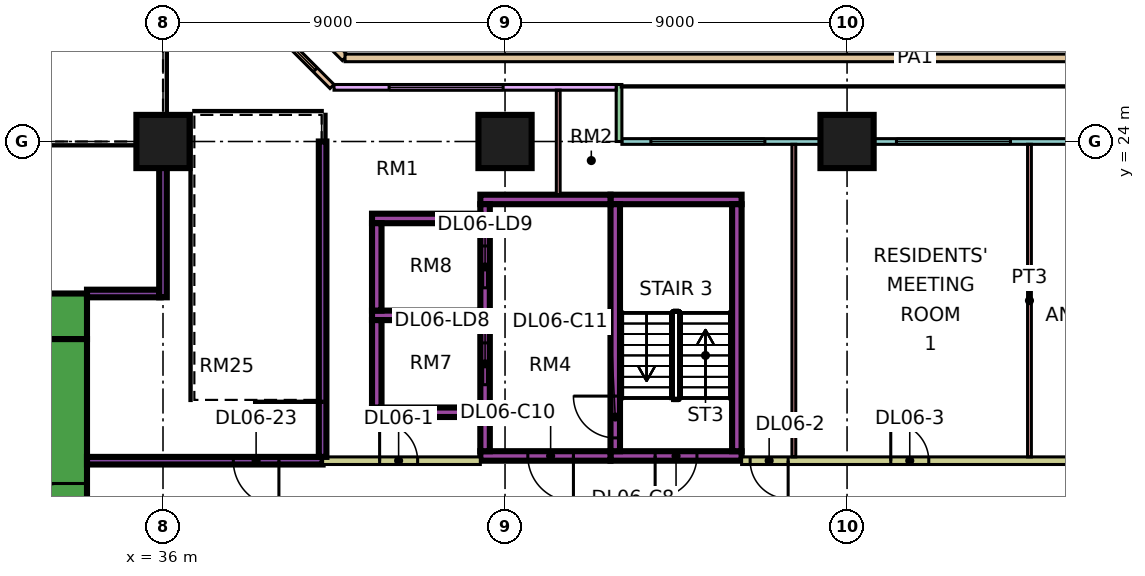
"""IFC4 building model, lengths in metres.
Left out: names, types, materials, properties, quantities, classifications, styles, units other than length and angle.
Written with IfcOpenShell. Run it as: python <this file> out.ifc"""

import sys

from ifc_helpers import new_model, si_unit, direction, frame, frame_2d, origin, origin_2d, place, context, subcontext, project, spatial, rectangle, extrude, element, fill, save


model = new_model("IFC4")
c1 = context("Model", 3, precision=1e-05, world=origin(), true_north=direction((0.0, 1.0)))
c2 = subcontext(c1, "Body", "Model", "MODEL_VIEW")
j1 = project(units=[si_unit("LENGTHUNIT", "METRE"), si_unit("PLANEANGLEUNIT", "RADIAN")], contexts=[c1])
p1 = place(None, origin())
s1 = spatial("IfcSite", under=j1, at=p1, CompositionType="ELEMENT")
p2 = place(p1, origin())
s2 = spatial("IfcBuilding", under=s1, at=p2, CompositionType="ELEMENT")
p3 = place(p2, frame((0.0, 0.0, 35.4)))
s3 = spatial("IfcBuildingStorey", under=s2, at=p3, CompositionType="ELEMENT", Elevation=35.4)
for number, where, z_axis, x_axis in (
    (1, (36.0, 24.0, 0.0), (0.0, 0.0, 1.0), (1.0, 0.0, 0.0)),
    (2, (45.0, 24.0, 0.0), (0.0, 0.0, 1.0), (1.0, 0.0, 0.0)),
    (3, (54.0, 24.0, 0.0), (0.0, 0.0, 1.0), (1.0, 0.0, 0.0)),
):
    element("IfcColumn", number, at=place(p3, frame(where, z_axis=z_axis, x_axis=x_axis)), inside=s3, PredefinedType="COLUMN", context=c2, shape_type="SweptSolid", body=[
        extrude(rectangle(XDim=1.4, YDim=1.4, at=origin_2d()), origin(), (0.0, 0.0, 1.0), 6.0),
    ])
p4 = place(p3, frame((9.0, 19.4, 0.0), z_axis=(0.0, 0.0, 1.0), x_axis=(1.0, 0.0, 0.0)))
e4 = element("IfcWall", 4, at=p4, inside=s3, PredefinedType="SHEAR", context=c2, shape_type="SweptSolid", body=[
    extrude(rectangle(XDim=25.0, YDim=1.2, at=frame_2d((12.5, 0.0))), origin(), (0.0, 0.0, 1.0), 6.0),
])
p5 = place(p4, frame((19.1, 0.0, 0.0)))
e5 = element("IfcOpeningElement", 5, at=p5, cuts=e4, PredefinedType="OPENING", context=c2, shape_type="SweptSolid", body=[
    extrude(rectangle(XDim=1.8, YDim=2.4, at=frame_2d((0.9, 1.2))), frame((0.0, 0.61, 0.0), z_axis=(0.0, -1.0, 0.0), x_axis=(1.0, 0.0, 0.0)), (0.0, 0.0, 1.0), 1.22),
])
p6 = place(p3, frame((33.4, 8.2, 0.0), z_axis=(0.0, 0.0, 1.0), x_axis=(0.0, 1.0, 0.0)))
e6 = element("IfcWall", 6, at=p6, inside=s3, PredefinedType="SHEAR", context=c2, shape_type="SweptSolid", body=[
    extrude(rectangle(XDim=10.6, YDim=1.2, at=frame_2d((5.3, 0.0))), origin(), (0.0, 0.0, 1.0), 6.0),
])
p7 = place(p6, frame((5.0, 0.0, 0.0)))
e7 = element("IfcOpeningElement", 7, at=p7, cuts=e6, PredefinedType="OPENING", context=c2, shape_type="SweptSolid", body=[
    extrude(rectangle(XDim=1.8, YDim=2.4, at=frame_2d((0.9, 1.2))), frame((0.0, 0.61, 0.0), z_axis=(0.0, -1.0, 0.0), x_axis=(1.0, 0.0, 0.0)), (0.0, 0.0, 1.0), 1.22),
])
p8 = place(p3, frame((47.775, 15.725, 0.0), z_axis=(0.0, 0.0, 1.0), x_axis=(1.0, 0.0, 0.0)))
e8 = element("IfcWall", 8, at=p8, inside=s3, PredefinedType="SHEAR", context=c2, shape_type="SweptSolid", body=[
    extrude(rectangle(XDim=3.45, YDim=0.25, at=frame_2d((1.725, 0.0))), origin(), (0.0, 0.0, 1.0), 6.0),
])
p9 = place(p8, frame((1.175, 0.0, 0.0)))
e9 = element("IfcOpeningElement", 9, at=p9, cuts=e8, PredefinedType="OPENING", context=c2, shape_type="SweptSolid", body=[
    extrude(rectangle(XDim=1.1, YDim=2.2, at=frame_2d((0.55, 1.1))), frame((0.0, 0.135, 0.0), z_axis=(0.0, -1.0, 0.0), x_axis=(1.0, 0.0, 0.0)), (0.0, 0.0, 1.0), 0.27),
])
p10 = place(p3, frame((47.775, 22.475, 0.0), z_axis=(0.0, 0.0, 1.0), x_axis=(1.0, 0.0, 0.0)))
e10 = element("IfcWall", 10, at=p10, inside=s3, PredefinedType="SHEAR", context=c2, shape_type="SweptSolid", body=[
    extrude(rectangle(XDim=3.45, YDim=0.25, at=frame_2d((1.725, 0.0))), origin(), (0.0, 0.0, 1.0), 6.0),
])
p11 = place(p3, frame((47.9, 15.85, 0.0), z_axis=(0.0, 0.0, 1.0), x_axis=(0.0, 1.0, 0.0)))
e11 = element("IfcWall", 11, at=p11, inside=s3, PredefinedType="SHEAR", context=c2, shape_type="SweptSolid", body=[
    extrude(rectangle(XDim=6.5, YDim=0.25, at=frame_2d((3.25, 0.0))), origin(), (0.0, 0.0, 1.0), 6.0),
])
p12 = place(p11, frame((0.35, 0.0, 0.0)))
e12 = element("IfcOpeningElement", 12, at=p12, cuts=e11, PredefinedType="OPENING", context=c2, shape_type="SweptSolid", body=[
    extrude(rectangle(XDim=1.1, YDim=2.2, at=frame_2d((0.55, 1.1))), frame((0.0, 0.135, 0.0), z_axis=(0.0, -1.0, 0.0), x_axis=(1.0, 0.0, 0.0)), (0.0, 0.0, 1.0), 0.27),
])
p13 = place(p3, frame((51.1, 15.85, 0.0), z_axis=(0.0, 0.0, 1.0), x_axis=(0.0, 1.0, 0.0)))
e13 = element("IfcWall", 13, at=p13, inside=s3, PredefinedType="SHEAR", context=c2, shape_type="SweptSolid", body=[
    extrude(rectangle(XDim=6.5, YDim=0.25, at=frame_2d((3.25, 0.0))), origin(), (0.0, 0.0, 1.0), 6.0),
])
p14 = place(p3, frame((44.35, 15.725, 0.0), z_axis=(0.0, 0.0, 1.0), x_axis=(1.0, 0.0, 0.0)))
e14 = element("IfcWall", 14, at=p14, inside=s3, PredefinedType="SHEAR", context=c2, shape_type="SweptSolid", body=[
    extrude(rectangle(XDim=3.425, YDim=0.25, at=frame_2d((1.712, 0.0))), origin(), (0.0, 0.0, 1.0), 6.0),
])
p15 = place(p14, frame((1.25, 0.0, 0.0)))
e15 = element("IfcOpeningElement", 15, at=p15, cuts=e14, PredefinedType="OPENING", context=c2, shape_type="SweptSolid", body=[
    extrude(rectangle(XDim=1.2, YDim=2.2, at=frame_2d((0.6, 1.1))), frame((0.0, 0.135, 0.0), z_axis=(0.0, -1.0, 0.0), x_axis=(1.0, 0.0, 0.0)), (0.0, 0.0, 1.0), 0.27),
])
p16 = place(p3, frame((44.35, 22.475, 0.0), z_axis=(0.0, 0.0, 1.0), x_axis=(1.0, 0.0, 0.0)))
e16 = element("IfcWall", 16, at=p16, inside=s3, PredefinedType="SHEAR", context=c2, shape_type="SweptSolid", body=[
    extrude(rectangle(XDim=3.425, YDim=0.25, at=frame_2d((1.712, 0.0))), origin(), (0.0, 0.0, 1.0), 6.0),
])
p17 = place(p3, frame((44.475, 15.85, 0.0), z_axis=(0.0, 0.0, 1.0), x_axis=(0.0, 1.0, 0.0)))
e17 = element("IfcWall", 17, at=p17, inside=s3, PredefinedType="SHEAR", context=c2, shape_type="SweptSolid", body=[
    extrude(rectangle(XDim=6.5, YDim=0.25, at=frame_2d((3.25, 0.0))), origin(), (0.0, 0.0, 1.0), 6.0),
])
p18 = place(p17, frame((1.75, 0.0, 0.0)))
e18 = element("IfcOpeningElement", 18, at=p18, cuts=e17, PredefinedType="OPENING", context=c2, shape_type="SweptSolid", body=[
    extrude(rectangle(XDim=1.1, YDim=2.2, at=frame_2d((0.55, 1.1))), frame((0.0, 0.135, 0.0), z_axis=(0.0, -1.0, 0.0), x_axis=(1.0, 0.0, 0.0)), (0.0, 0.0, 1.0), 0.27),
])
p19 = place(p17, frame((4.3, 0.0, 0.0)))
e19 = element("IfcOpeningElement", 19, at=p19, cuts=e17, PredefinedType="OPENING", context=c2, shape_type="SweptSolid", body=[
    extrude(rectangle(XDim=1.1, YDim=2.2, at=frame_2d((0.55, 1.1))), frame((0.0, 0.135, 0.0), z_axis=(0.0, -1.0, 0.0), x_axis=(1.0, 0.0, 0.0)), (0.0, 0.0, 1.0), 0.27),
])
for number, where, z_axis, x_axis in (
    (20, (41.5, 16.875, 0.0), (0.0, 0.0, 1.0), (1.0, 0.0, 0.0)),
    (21, (41.5, 19.425, 0.0), (0.0, 0.0, 1.0), (1.0, 0.0, 0.0)),
    (22, (41.5, 21.975, 0.0), (0.0, 0.0, 1.0), (1.0, 0.0, 0.0)),
):
    element("IfcWall", number, at=place(p3, frame(where, z_axis=z_axis, x_axis=x_axis)), inside=s3, PredefinedType="SHEAR", context=c2, shape_type="SweptSolid", body=[
        extrude(rectangle(XDim=2.85, YDim=0.25, at=frame_2d((1.425, 0.0))), origin(), (0.0, 0.0, 1.0), 6.0),
    ])
for number, where, z_axis, x_axis in (
    (23, (41.625, 17.0, 0.0), (0.0, 0.0, 1.0), (0.0, 1.0, 0.0)),
    (24, (41.625, 19.55, 0.0), (0.0, 0.0, 1.0), (0.0, 1.0, 0.0)),
):
    element("IfcWall", number, at=place(p3, frame(where, z_axis=z_axis, x_axis=x_axis)), inside=s3, PredefinedType="SHEAR", context=c2, shape_type="SweptSolid", body=[
        extrude(rectangle(XDim=2.3, YDim=0.25, at=frame_2d((1.15, 0.0))), origin(), (0.0, 0.0, 1.0), 6.0),
    ])
p20 = place(p3, frame((59.925, 24.0, 0.0), z_axis=(0.0, 0.0, 1.0), x_axis=(-1.0, 0.0, 0.0)))
e25 = element("IfcWall", 25, at=p20, inside=s3, PredefinedType="SOLIDWALL", context=c2, shape_type="SweptSolid", body=[
    extrude(rectangle(XDim=11.85, YDim=0.15, at=frame_2d((5.925, 0.0))), origin(), (0.0, 0.0, 1.0), 5.6),
])
p21 = place(p20, frame((1.625, 0.0, 0.45)))
e26 = element("IfcOpeningElement", 26, at=p21, cuts=e25, PredefinedType="OPENING", context=c2, shape_type="SweptSolid", body=[
    extrude(rectangle(XDim=3.0, YDim=3.6, at=frame_2d((1.5, 1.8))), frame((0.0, 0.085, 0.0), z_axis=(0.0, -1.0, 0.0), x_axis=(1.0, 0.0, 0.0)), (0.0, 0.0, 1.0), 0.17),
])
p22 = place(p20, frame((8.087, 0.0, 0.45)))
e27 = element("IfcOpeningElement", 27, at=p22, cuts=e25, PredefinedType="OPENING", context=c2, shape_type="SweptSolid", body=[
    extrude(rectangle(XDim=3.0, YDim=3.6, at=frame_2d((1.5, 1.8))), frame((0.0, 0.085, 0.0), z_axis=(0.0, -1.0, 0.0), x_axis=(1.0, 0.0, 0.0)), (0.0, 0.0, 1.0), 0.17),
])
p23 = place(p3, frame((48.0, 25.5, 0.0), z_axis=(0.0, 0.0, 1.0), x_axis=(0.0, -1.0, 0.0)))
e28 = element("IfcWall", 28, at=p23, inside=s3, PredefinedType="SOLIDWALL", context=c2, shape_type="SweptSolid", body=[
    extrude(rectangle(XDim=1.5, YDim=0.15, at=frame_2d((0.75, 0.0))), origin(), (0.0, 0.0, 1.0), 5.6),
])
p24 = place(p3, frame((47.925, 25.425, 0.0), z_axis=(0.0, 0.0, 1.0), x_axis=(-1.0, 0.0, 0.0)))
e29 = element("IfcWall", 29, at=p24, inside=s3, PredefinedType="SOLIDWALL", context=c2, shape_type="SweptSolid", body=[
    extrude(rectangle(XDim=7.425, YDim=0.15, at=frame_2d((3.712, 0.0))), origin(), (0.0, 0.0, 1.0), 5.6),
])
p25 = place(p24, frame((2.975, 0.0, 0.45)))
e30 = element("IfcOpeningElement", 30, at=p25, cuts=e29, PredefinedType="OPENING", context=c2, shape_type="SweptSolid", body=[
    extrude(rectangle(XDim=3.0, YDim=3.6, at=frame_2d((1.5, 1.8))), frame((0.0, 0.085, 0.0), z_axis=(0.0, -1.0, 0.0), x_axis=(1.0, 0.0, 0.0)), (0.0, 0.0, 1.0), 0.17),
])
p26 = place(p3, frame((40.447, 25.447, 0.0), z_axis=(0.0, 0.0, 1.0), x_axis=(-0.707106781187, 0.707106781187, 0.0)))
e31 = element("IfcWall", 31, at=p26, inside=s3, PredefinedType="SOLIDWALL", context=c2, shape_type="SweptSolid", body=[
    extrude(rectangle(XDim=4.243, YDim=0.15, at=frame_2d((2.121, 0.0))), origin(), (0.0, 0.0, 1.0), 5.6),
])
p27 = place(p26, frame((0.621, 0.0, 0.45)))
e32 = element("IfcOpeningElement", 32, at=p27, cuts=e31, PredefinedType="OPENING", context=c2, shape_type="SweptSolid", body=[
    extrude(rectangle(XDim=3.0, YDim=3.6, at=frame_2d((1.5, 1.8))), frame((0.0, 0.085, 0.0), z_axis=(0.0, -1.0, 0.0), x_axis=(1.0, 0.0, 0.0)), (0.0, 0.0, 1.0), 0.17),
])
p28 = place(p3, frame((38.2, 28.79, 0.0), z_axis=(0.0, 0.0, 1.0), x_axis=(0.707106781187, -0.707106781187, 0.0)))
e33 = element("IfcWall", 33, at=p28, inside=s3, PredefinedType="PARAPET", context=c2, shape_type="SweptSolid", body=[
    extrude(rectangle(XDim=3.663, YDim=0.2, at=frame_2d((1.832, 0.0))), origin(), (0.0, 0.0, 1.0), 0.5),
])
p29 = place(p3, frame((40.79, 26.2, 0.0), z_axis=(0.0, 0.0, 1.0), x_axis=(1.0, 0.0, 0.0)))
e34 = element("IfcWall", 34, at=p29, inside=s3, PredefinedType="PARAPET", context=c2, shape_type="SweptSolid", body=[
    extrude(rectangle(XDim=30.0, YDim=0.2, at=frame_2d((15.0, 0.0))), origin(), (0.0, 0.0, 1.0), 0.5),
])
p30 = place(p3, frame((34.0, 15.6, 0.0), z_axis=(0.0, 0.0, 1.0), x_axis=(1.0, 0.0, 0.0)))
e35 = element("IfcWall", 35, at=p30, inside=s3, PredefinedType="SOLIDWALL", context=c2, shape_type="SweptSolid", body=[
    extrude(rectangle(XDim=6.2, YDim=0.2, at=frame_2d((3.1, 0.0))), origin(), (0.0, 0.0, 1.0), 5.6),
])
p31 = place(p30, frame((3.85, 0.0, 0.0)))
e36 = element("IfcOpeningElement", 36, at=p31, cuts=e35, PredefinedType="OPENING", context=c2, shape_type="SweptSolid", body=[
    extrude(rectangle(XDim=1.2, YDim=2.1, at=frame_2d((0.6, 1.05))), frame((0.0, 0.11, 0.0), z_axis=(0.0, -1.0, 0.0), x_axis=(1.0, 0.0, 0.0)), (0.0, 0.0, 1.0), 0.22),
])
p32 = place(p3, frame((34.0, 20.0, 0.0), z_axis=(0.0, 0.0, 1.0), x_axis=(1.0, 0.0, 0.0)))
e37 = element("IfcWall", 37, at=p32, inside=s3, PredefinedType="SOLIDWALL", context=c2, shape_type="SweptSolid", body=[
    extrude(rectangle(XDim=1.9, YDim=0.2, at=frame_2d((0.95, 0.0))), origin(), (0.0, 0.0, 1.0), 5.6),
])
p33 = place(p3, frame((36.0, 19.9, 0.0), z_axis=(0.0, 0.0, 1.0), x_axis=(0.0, 1.0, 0.0)))
e38 = element("IfcWall", 38, at=p33, inside=s3, PredefinedType="SOLIDWALL", context=c2, shape_type="SweptSolid", body=[
    extrude(rectangle(XDim=4.1, YDim=0.2, at=frame_2d((2.05, 0.0))), origin(), (0.0, 0.0, 1.0), 5.6),
])
p34 = place(p3, frame((40.2, 15.6, 0.0), z_axis=(0.0, 0.0, 1.0), x_axis=(1.0, 0.0, 0.0)))
e39 = element("IfcWall", 39, at=p34, inside=s3, PredefinedType="PARTITIONING", context=c2, shape_type="SweptSolid", body=[
    extrude(rectangle(XDim=4.15, YDim=0.2, at=frame_2d((2.075, 0.0))), origin(), (0.0, 0.0, 1.0), 5.6),
])
p35 = place(p34, frame((1.5, 0.0, 0.0)))
e40 = element("IfcOpeningElement", 40, at=p35, cuts=e39, PredefinedType="OPENING", context=c2, shape_type="SweptSolid", body=[
    extrude(rectangle(XDim=1.0, YDim=2.1, at=frame_2d((0.5, 1.05))), frame((0.0, 0.11, 0.0), z_axis=(0.0, -1.0, 0.0), x_axis=(1.0, 0.0, 0.0)), (0.0, 0.0, 1.0), 0.22),
])
p36 = place(p3, frame((40.2, 15.7, 0.0), z_axis=(0.0, 0.0, 1.0), x_axis=(0.0, 1.0, 0.0)))
e41 = element("IfcWall", 41, at=p36, inside=s3, PredefinedType="SOLIDWALL", context=c2, shape_type="SweptSolid", body=[
    extrude(rectangle(XDim=8.3, YDim=0.2, at=frame_2d((4.15, 0.0))), origin(), (0.0, 0.0, 1.0), 5.6),
])
p37 = place(p3, frame((46.4, 22.6, 0.0), z_axis=(0.0, 0.0, 1.0), x_axis=(0.0, 1.0, 0.0)))
e42 = element("IfcWall", 42, at=p37, inside=s3, PredefinedType="PARTITIONING", context=c2, shape_type="SweptSolid", body=[
    extrude(rectangle(XDim=2.751, YDim=0.1, at=frame_2d((1.375, 0.0))), origin(), (0.0, 0.0, 1.0), 5.6),
])
p38 = place(p3, frame((51.225, 15.6, 0.0), z_axis=(0.0, 0.0, 1.0), x_axis=(1.0, 0.0, 0.0)))
e43 = element("IfcWall", 43, at=p38, inside=s3, PredefinedType="PARTITIONING", context=c2, shape_type="SweptSolid", body=[
    extrude(rectangle(XDim=21.575, YDim=0.2, at=frame_2d((10.788, 0.0))), origin(), (0.0, 0.0, 1.0), 5.6),
])
p39 = place(p38, frame((0.225, 0.0, 0.0)))
e44 = element("IfcOpeningElement", 44, at=p39, cuts=e43, PredefinedType="OPENING", context=c2, shape_type="SweptSolid", body=[
    extrude(rectangle(XDim=1.0, YDim=2.1, at=frame_2d((0.5, 1.05))), frame((0.0, 0.11, 0.0), z_axis=(0.0, -1.0, 0.0), x_axis=(1.0, 0.0, 0.0)), (0.0, 0.0, 1.0), 0.22),
])
p40 = place(p38, frame((3.925, 0.0, 0.0)))
e45 = element("IfcOpeningElement", 45, at=p40, cuts=e43, PredefinedType="OPENING", context=c2, shape_type="SweptSolid", body=[
    extrude(rectangle(XDim=1.0, YDim=2.1, at=frame_2d((0.5, 1.05))), frame((0.0, 0.11, 0.0), z_axis=(0.0, -1.0, 0.0), x_axis=(1.0, 0.0, 0.0)), (0.0, 0.0, 1.0), 0.22),
])
p41 = place(p38, frame((10.125, 0.0, 0.0)))
e46 = element("IfcOpeningElement", 46, at=p41, cuts=e43, PredefinedType="OPENING", context=c2, shape_type="SweptSolid", body=[
    extrude(rectangle(XDim=1.0, YDim=2.1, at=frame_2d((0.5, 1.05))), frame((0.0, 0.11, 0.0), z_axis=(0.0, -1.0, 0.0), x_axis=(1.0, 0.0, 0.0)), (0.0, 0.0, 1.0), 0.22),
])
p42 = place(p38, frame((16.325, 0.0, 0.0)))
e47 = element("IfcOpeningElement", 47, at=p42, cuts=e43, PredefinedType="OPENING", context=c2, shape_type="SweptSolid", body=[
    extrude(rectangle(XDim=1.0, YDim=2.1, at=frame_2d((0.5, 1.05))), frame((0.0, 0.11, 0.0), z_axis=(0.0, -1.0, 0.0), x_axis=(1.0, 0.0, 0.0)), (0.0, 0.0, 1.0), 0.22),
])
for number, where, z_axis, x_axis in (
    (48, (52.6, 15.7, 0.0), (0.0, 0.0, 1.0), (0.0, 1.0, 0.0)),
    (49, (58.8, 15.7, 0.0), (0.0, 0.0, 1.0), (0.0, 1.0, 0.0)),
):
    element("IfcWall", number, at=place(p3, frame(where, z_axis=z_axis, x_axis=x_axis)), inside=s3, PredefinedType="PARTITIONING", context=c2, shape_type="SweptSolid", body=[
        extrude(rectangle(XDim=8.226, YDim=0.1, at=frame_2d((4.113, 0.0))), origin(), (0.0, 0.0, 1.0), 5.6),
    ])
p43 = place(p21, origin())
e50 = element("IfcWindow", 50, at=p43, inside=s3, PartitioningType="SINGLE_PANEL", PredefinedType="WINDOW", context=c2, shape_type="SweptSolid", body=[
    extrude(rectangle(XDim=3.0, YDim=3.6, at=frame_2d((1.5, 1.8))), frame((0.0, 0.03, 0.0), z_axis=(0.0, -1.0, 0.0), x_axis=(1.0, 0.0, 0.0)), (0.0, 0.0, 1.0), 0.06),
])
fill(e26, e50)
p44 = place(p22, origin())
e51 = element("IfcWindow", 51, at=p44, inside=s3, PartitioningType="SINGLE_PANEL", PredefinedType="WINDOW", context=c2, shape_type="SweptSolid", body=[
    extrude(rectangle(XDim=3.0, YDim=3.6, at=frame_2d((1.5, 1.8))), frame((0.0, 0.03, 0.0), z_axis=(0.0, -1.0, 0.0), x_axis=(1.0, 0.0, 0.0)), (0.0, 0.0, 1.0), 0.06),
])
fill(e27, e51)
p45 = place(p25, origin())
e52 = element("IfcWindow", 52, at=p45, inside=s3, PartitioningType="SINGLE_PANEL", PredefinedType="WINDOW", context=c2, shape_type="SweptSolid", body=[
    extrude(rectangle(XDim=3.0, YDim=3.6, at=frame_2d((1.5, 1.8))), frame((0.0, 0.03, 0.0), z_axis=(0.0, -1.0, 0.0), x_axis=(1.0, 0.0, 0.0)), (0.0, 0.0, 1.0), 0.06),
])
fill(e30, e52)
p46 = place(p27, origin())
e53 = element("IfcWindow", 53, at=p46, inside=s3, PartitioningType="SINGLE_PANEL", PredefinedType="WINDOW", context=c2, shape_type="SweptSolid", body=[
    extrude(rectangle(XDim=3.0, YDim=3.6, at=frame_2d((1.5, 1.8))), frame((0.0, 0.03, 0.0), z_axis=(0.0, -1.0, 0.0), x_axis=(1.0, 0.0, 0.0)), (0.0, 0.0, 1.0), 0.06),
])
fill(e32, e53)
p47 = place(p7, origin())
e54 = element("IfcDoor", 54, at=p47, inside=s3, OperationType="DOUBLE_DOOR_SINGLE_SWING", PredefinedType="DOOR", context=c2, shape_type="SweptSolid", body=[
    extrude(rectangle(XDim=1.8, YDim=2.4, at=frame_2d((0.9, 1.2))), frame((0.0, 0.025, 0.0), z_axis=(0.0, -1.0, 0.0), x_axis=(1.0, 0.0, 0.0)), (0.0, 0.0, 1.0), 0.05),
])
fill(e7, e54)
p48 = place(p9, frame((1.1, 0.0, 0.0), z_axis=(0.0, 0.0, 1.0), x_axis=(-1.0, 0.0, 0.0)))
e55 = element("IfcDoor", 55, at=p48, inside=s3, OperationType="SINGLE_SWING_LEFT", PredefinedType="DOOR", context=c2, shape_type="SweptSolid", body=[
    extrude(rectangle(XDim=1.1, YDim=2.2, at=frame_2d((0.55, 1.1))), frame((0.0, 0.025, 0.0), z_axis=(0.0, -1.0, 0.0), x_axis=(1.0, 0.0, 0.0)), (0.0, 0.0, 1.0), 0.05),
])
fill(e9, e55)
p49 = place(p15, origin())
e56 = element("IfcDoor", 56, at=p49, inside=s3, OperationType="SINGLE_SWING_RIGHT", PredefinedType="DOOR", context=c2, shape_type="SweptSolid", body=[
    extrude(rectangle(XDim=1.2, YDim=2.2, at=frame_2d((0.6, 1.1))), frame((0.0, 0.025, 0.0), z_axis=(0.0, -1.0, 0.0), x_axis=(1.0, 0.0, 0.0)), (0.0, 0.0, 1.0), 0.05),
])
fill(e15, e56)
p50 = place(p12, frame((1.1, 0.0, 0.0), z_axis=(0.0, 0.0, 1.0), x_axis=(-1.0, 0.0, 0.0)))
e57 = element("IfcDoor", 57, at=p50, inside=s3, OperationType="SINGLE_SWING_RIGHT", PredefinedType="DOOR", context=c2, shape_type="SweptSolid", body=[
    extrude(rectangle(XDim=1.1, YDim=2.2, at=frame_2d((0.55, 1.1))), frame((0.0, 0.025, 0.0), z_axis=(0.0, -1.0, 0.0), x_axis=(1.0, 0.0, 0.0)), (0.0, 0.0, 1.0), 0.05),
])
fill(e12, e57)
p51 = place(p18, origin())
e58 = element("IfcDoor", 58, at=p51, inside=s3, OperationType="DOUBLE_DOOR_SLIDING", PredefinedType="DOOR", context=c2, shape_type="SweptSolid", body=[
    extrude(rectangle(XDim=1.1, YDim=2.2, at=frame_2d((0.55, 1.1))), frame((0.0, 0.025, 0.0), z_axis=(0.0, -1.0, 0.0), x_axis=(1.0, 0.0, 0.0)), (0.0, 0.0, 1.0), 0.05),
])
fill(e18, e58)
p52 = place(p19, origin())
e59 = element("IfcDoor", 59, at=p52, inside=s3, OperationType="DOUBLE_DOOR_SLIDING", PredefinedType="DOOR", context=c2, shape_type="SweptSolid", body=[
    extrude(rectangle(XDim=1.1, YDim=2.2, at=frame_2d((0.55, 1.1))), frame((0.0, 0.025, 0.0), z_axis=(0.0, -1.0, 0.0), x_axis=(1.0, 0.0, 0.0)), (0.0, 0.0, 1.0), 0.05),
])
fill(e19, e59)
p53 = place(p35, origin())
e60 = element("IfcDoor", 60, at=p53, inside=s3, OperationType="SINGLE_SWING_LEFT", PredefinedType="DOOR", context=c2, shape_type="SweptSolid", body=[
    extrude(rectangle(XDim=1.0, YDim=2.1, at=frame_2d((0.5, 1.05))), frame((0.0, 0.025, 0.0), z_axis=(0.0, -1.0, 0.0), x_axis=(1.0, 0.0, 0.0)), (0.0, 0.0, 1.0), 0.05),
])
fill(e40, e60)
p54 = place(p39, origin())
e61 = element("IfcDoor", 61, at=p54, inside=s3, OperationType="SINGLE_SWING_RIGHT", PredefinedType="DOOR", context=c2, shape_type="SweptSolid", body=[
    extrude(rectangle(XDim=1.0, YDim=2.1, at=frame_2d((0.5, 1.05))), frame((0.0, 0.025, 0.0), z_axis=(0.0, -1.0, 0.0), x_axis=(1.0, 0.0, 0.0)), (0.0, 0.0, 1.0), 0.05),
])
fill(e44, e61)
p55 = place(p40, origin())
e62 = element("IfcDoor", 62, at=p55, inside=s3, OperationType="SINGLE_SWING_LEFT", PredefinedType="DOOR", context=c2, shape_type="SweptSolid", body=[
    extrude(rectangle(XDim=1.0, YDim=2.1, at=frame_2d((0.5, 1.05))), frame((0.0, 0.025, 0.0), z_axis=(0.0, -1.0, 0.0), x_axis=(1.0, 0.0, 0.0)), (0.0, 0.0, 1.0), 0.05),
])
fill(e45, e62)
p56 = place(p31, origin())
e63 = element("IfcDoor", 63, at=p56, inside=s3, OperationType="SINGLE_SWING_RIGHT", PredefinedType="DOOR", context=c2, shape_type="SweptSolid", body=[
    extrude(rectangle(XDim=1.2, YDim=2.1, at=frame_2d((0.6, 1.05))), frame((0.0, 0.025, 0.0), z_axis=(0.0, -1.0, 0.0), x_axis=(1.0, 0.0, 0.0)), (0.0, 0.0, 1.0), 0.05),
])
fill(e36, e63)
save(model, sys.argv[1])
